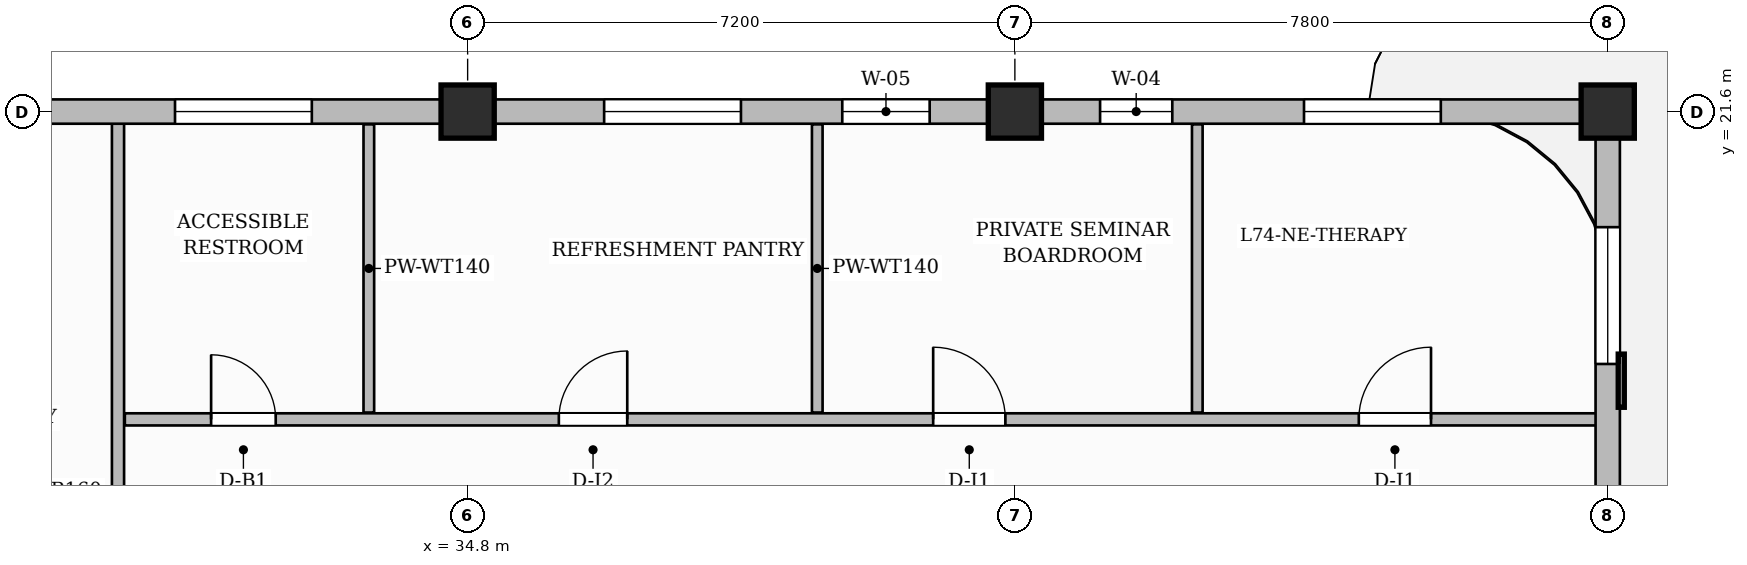
"""IFC4 building model, lengths in metres.
Left out: names, types, materials, properties, quantities, classifications, styles, units other than length and angle.
Written with IfcOpenShell. Run it as: python <this file> out.ifc"""

import sys

from ifc_helpers import new_model, si_unit, direction, frame, frame_2d, origin, origin_2d, place, context, subcontext, project, spatial, rectangle, extrude, source, transform, mapped, element, fill, save


model = new_model("IFC4")
c1 = context("Model", 3, precision=1e-05, world=origin(), true_north=direction((0.0, 1.0)))
c2 = subcontext(c1, "Body", "Model", "MODEL_VIEW")
j1 = project(units=[si_unit("LENGTHUNIT", "METRE"), si_unit("PLANEANGLEUNIT", "RADIAN")], contexts=[c1])
p1 = place(None, origin())
s1 = spatial("IfcSite", under=j1, at=p1, CompositionType="ELEMENT")
p2 = place(p1, origin())
s2 = spatial("IfcBuilding", under=s1, at=p2, CompositionType="ELEMENT")
p3 = place(p2, frame((0.0, 0.0, 294.3)))
s3 = spatial("IfcBuildingStorey", under=s2, at=p3, CompositionType="ELEMENT", Elevation=294.3)
m1 = source(origin(), c2, "Body", "SweptSolid", [
    extrude(rectangle(XDim=0.7, YDim=0.7, at=origin_2d()), origin(), (0.0, 0.0, 1.0), 4.8),
])
for number, where, z_axis, x_axis in (
    (1, (34.8, 21.6, 0.0), (0.0, 0.0, 1.0), (1.0, 0.0, 0.0)),
    (2, (42.0, 21.6, 0.0), (0.0, 0.0, 1.0), (1.0, 0.0, 0.0)),
    (3, (49.8, 21.6, 0.0), (0.0, 0.0, 1.0), (1.0, 0.0, 0.0)),
):
    element("IfcColumn", number, at=place(p3, frame(where, z_axis=z_axis, x_axis=x_axis)), inside=s3, PredefinedType="COLUMN", context=c2, shape_type="MappedRepresentation", body=[
        mapped(m1, transform((0.0, 0.0, 0.0), scale=1.0)),
    ])
p4 = place(p3, frame((30.2, 11.76, 0.0), z_axis=(0.0, 0.0, 1.0), x_axis=(0.0, 1.0, 0.0)))
e4 = element("IfcWall", 4, at=p4, inside=s3, PredefinedType="PARTITIONING", context=c2, shape_type="SweptSolid", body=[
    extrude(rectangle(XDim=9.7, YDim=0.16, at=frame_2d((4.85, 0.0))), origin(), (0.0, 0.0, 1.0), 4.5),
])
p5 = place(p3, frame((30.29, 17.55, 0.0), z_axis=(0.0, 0.0, 1.0), x_axis=(1.0, 0.0, 0.0)))
e5 = element("IfcWall", 5, at=p5, inside=s3, PredefinedType="PARTITIONING", context=c2, shape_type="SweptSolid", body=[
    extrude(rectangle(XDim=19.37, YDim=0.16, at=frame_2d((9.685, 0.0))), origin(), (0.0, 0.0, 1.0), 4.5),
])
p6 = place(p5, frame((1.135, 0.0, 0.0)))
e6 = element("IfcOpeningElement", 6, at=p6, cuts=e5, PredefinedType="OPENING", context=c2, shape_type="SweptSolid", body=[
    extrude(rectangle(XDim=0.85, YDim=2.1, at=frame_2d((0.425, 1.05))), frame((0.0, 0.09, 0.0), z_axis=(0.0, -1.0, 0.0), x_axis=(1.0, 0.0, 0.0)), (0.0, 0.0, 1.0), 0.18),
])
p7 = place(p5, frame((5.71, 0.0, 0.0)))
e7 = element("IfcOpeningElement", 7, at=p7, cuts=e5, PredefinedType="OPENING", context=c2, shape_type="SweptSolid", body=[
    extrude(rectangle(XDim=0.9, YDim=2.15, at=frame_2d((0.45, 1.075))), frame((0.0, 0.09, 0.0), z_axis=(0.0, -1.0, 0.0), x_axis=(1.0, 0.0, 0.0)), (0.0, 0.0, 1.0), 0.18),
])
p8 = place(p5, frame((10.635, 0.0, 0.0)))
e8 = element("IfcOpeningElement", 8, at=p8, cuts=e5, PredefinedType="OPENING", context=c2, shape_type="SweptSolid", body=[
    extrude(rectangle(XDim=0.95, YDim=2.15, at=frame_2d((0.475, 1.075))), frame((0.0, 0.09, 0.0), z_axis=(0.0, -1.0, 0.0), x_axis=(1.0, 0.0, 0.0)), (0.0, 0.0, 1.0), 0.18),
])
p9 = place(p5, frame((16.235, 0.0, 0.0)))
e9 = element("IfcOpeningElement", 9, at=p9, cuts=e5, PredefinedType="OPENING", context=c2, shape_type="SweptSolid", body=[
    extrude(rectangle(XDim=0.95, YDim=2.15, at=frame_2d((0.475, 1.075))), frame((0.0, 0.09, 0.0), z_axis=(0.0, -1.0, 0.0), x_axis=(1.0, 0.0, 0.0)), (0.0, 0.0, 1.0), 0.18),
])
for number, where, z_axis, x_axis in (
    (10, (33.5, 17.64, 0.0), (0.0, 0.0, 1.0), (0.0, 1.0, 0.0)),
    (11, (39.4, 17.64, 0.0), (0.0, 0.0, 1.0), (0.0, 1.0, 0.0)),
    (12, (44.4, 17.64, 0.0), (0.0, 0.0, 1.0), (0.0, 1.0, 0.0)),
):
    element("IfcWall", number, at=place(p3, frame(where, z_axis=z_axis, x_axis=x_axis)), inside=s3, PredefinedType="PARTITIONING", context=c2, shape_type="SweptSolid", body=[
        extrude(rectangle(XDim=3.792, YDim=0.14, at=frame_2d((1.896, 0.0))), origin(), (0.0, 0.0, 1.0), 4.5),
    ])
p10 = place(p3, frame((49.8, 14.62, 0.0), z_axis=(0.0, 0.0, 1.0), x_axis=(0.0, 1.0, 0.0)))
e13 = element("IfcWall", 13, at=p10, inside=s3, PredefinedType="SOLIDWALL", context=c2, shape_type="SweptSolid", body=[
    extrude(rectangle(XDim=6.93, YDim=0.32, at=frame_2d((3.465, 0.0))), origin(), (0.0, 0.0, 1.0), 4.085),
])
p11 = place(p10, frame((0.42, 0.0, 0.0)))
e14 = element("IfcOpeningElement", 14, at=p11, cuts=e13, PredefinedType="OPENING", context=c2, shape_type="SweptSolid", body=[
    extrude(rectangle(XDim=1.2, YDim=2.2, at=frame_2d((0.6, 1.1))), frame((0.0, 0.17, 0.0), z_axis=(0.0, -1.0, 0.0), x_axis=(1.0, 0.0, 0.0)), (0.0, 0.0, 1.0), 0.34),
])
p12 = place(p10, frame((3.659, 0.0, 0.8)))
e15 = element("IfcOpeningElement", 15, at=p12, cuts=e13, PredefinedType="OPENING", context=c2, shape_type="SweptSolid", body=[
    extrude(rectangle(XDim=1.8, YDim=1.85, at=frame_2d((0.9, 0.925))), frame((0.0, 0.17, 0.0), z_axis=(0.0, -1.0, 0.0), x_axis=(1.0, 0.0, 0.0)), (0.0, 0.0, 1.0), 0.34),
])
p13 = place(p3, frame((18.0, 21.6, 0.0), z_axis=(0.0, 0.0, 1.0), x_axis=(1.0, 0.0, 0.0)))
e16 = element("IfcWall", 16, at=p13, inside=s3, PredefinedType="SOLIDWALL", context=c2, shape_type="SweptSolid", body=[
    extrude(rectangle(XDim=31.8, YDim=0.32, at=frame_2d((15.9, 0.0))), origin(), (0.0, 0.0, 1.0), 3.785),
])
p14 = place(p13, frame((0.42, 0.0, 0.0)))
e17 = element("IfcOpeningElement", 17, at=p14, cuts=e16, PredefinedType="OPENING", context=c2, shape_type="SweptSolid", body=[
    extrude(rectangle(XDim=1.2, YDim=2.2, at=frame_2d((0.6, 1.1))), frame((0.0, 0.17, 0.0), z_axis=(0.0, -1.0, 0.0), x_axis=(1.0, 0.0, 0.0)), (0.0, 0.0, 1.0), 0.34),
])
p15 = place(p13, frame((4.671, 0.0, 0.8)))
e18 = element("IfcOpeningElement", 18, at=p15, cuts=e16, PredefinedType="OPENING", context=c2, shape_type="SweptSolid", body=[
    extrude(rectangle(XDim=1.15, YDim=1.8, at=frame_2d((0.575, 0.9))), frame((0.0, 0.17, 0.0), z_axis=(0.0, -1.0, 0.0), x_axis=(1.0, 0.0, 0.0)), (0.0, 0.0, 1.0), 0.34),
])
p16 = place(p13, frame((7.154, 0.0, 0.8)))
e19 = element("IfcOpeningElement", 19, at=p16, cuts=e16, PredefinedType="OPENING", context=c2, shape_type="SweptSolid", body=[
    extrude(rectangle(XDim=1.8, YDim=1.85, at=frame_2d((0.9, 0.925))), frame((0.0, 0.17, 0.0), z_axis=(0.0, -1.0, 0.0), x_axis=(1.0, 0.0, 0.0)), (0.0, 0.0, 1.0), 0.34),
])
p17 = place(p13, frame((12.95, 0.0, 0.8)))
e20 = element("IfcOpeningElement", 20, at=p17, cuts=e16, PredefinedType="OPENING", context=c2, shape_type="SweptSolid", body=[
    extrude(rectangle(XDim=1.8, YDim=1.85, at=frame_2d((0.9, 0.925))), frame((0.0, 0.17, 0.0), z_axis=(0.0, -1.0, 0.0), x_axis=(1.0, 0.0, 0.0)), (0.0, 0.0, 1.0), 0.34),
])
p18 = place(p13, frame((18.596, 0.0, 0.8)))
e21 = element("IfcOpeningElement", 21, at=p18, cuts=e16, PredefinedType="OPENING", context=c2, shape_type="SweptSolid", body=[
    extrude(rectangle(XDim=1.8, YDim=1.85, at=frame_2d((0.9, 0.925))), frame((0.0, 0.17, 0.0), z_axis=(0.0, -1.0, 0.0), x_axis=(1.0, 0.0, 0.0)), (0.0, 0.0, 1.0), 0.34),
])
p19 = place(p13, frame((21.729, 0.0, 0.8)))
e22 = element("IfcOpeningElement", 22, at=p19, cuts=e16, PredefinedType="OPENING", context=c2, shape_type="SweptSolid", body=[
    extrude(rectangle(XDim=1.15, YDim=1.8, at=frame_2d((0.575, 0.9))), frame((0.0, 0.17, 0.0), z_axis=(0.0, -1.0, 0.0), x_axis=(1.0, 0.0, 0.0)), (0.0, 0.0, 1.0), 0.34),
])
p20 = place(p13, frame((25.121, 0.0, 0.8)))
e23 = element("IfcOpeningElement", 23, at=p20, cuts=e16, PredefinedType="OPENING", context=c2, shape_type="SweptSolid", body=[
    extrude(rectangle(XDim=0.95, YDim=1.75, at=frame_2d((0.475, 0.875))), frame((0.0, 0.17, 0.0), z_axis=(0.0, -1.0, 0.0), x_axis=(1.0, 0.0, 0.0)), (0.0, 0.0, 1.0), 0.34),
])
p21 = place(p13, frame((27.804, 0.0, 0.8)))
e24 = element("IfcOpeningElement", 24, at=p21, cuts=e16, PredefinedType="OPENING", context=c2, shape_type="SweptSolid", body=[
    extrude(rectangle(XDim=1.8, YDim=1.85, at=frame_2d((0.9, 0.925))), frame((0.0, 0.17, 0.0), z_axis=(0.0, -1.0, 0.0), x_axis=(1.0, 0.0, 0.0)), (0.0, 0.0, 1.0), 0.34),
])
m2 = source(origin(), c2, "Body", "SweptSolid", [
    extrude(rectangle(XDim=0.85, YDim=2.1, at=frame_2d((0.425, 1.05))), frame((0.0, 0.025, 0.0), z_axis=(0.0, -1.0, 0.0), x_axis=(1.0, 0.0, 0.0)), (0.0, 0.0, 1.0), 0.05),
])
p22 = place(p6, origin())
e25 = element("IfcDoor", 25, at=p22, inside=s3, OperationType="SINGLE_SWING_LEFT", PredefinedType="DOOR", context=c2, shape_type="MappedRepresentation", body=[
    mapped(m2, transform((0.0, 0.0, 0.0), scale=1.0)),
])
fill(e6, e25)
m3 = source(origin(), c2, "Body", "SweptSolid", [
    extrude(rectangle(XDim=0.9, YDim=2.15, at=frame_2d((0.45, 1.075))), frame((0.0, 0.025, 0.0), z_axis=(0.0, -1.0, 0.0), x_axis=(1.0, 0.0, 0.0)), (0.0, 0.0, 1.0), 0.05),
])
p23 = place(p7, origin())
e26 = element("IfcDoor", 26, at=p23, inside=s3, OperationType="SINGLE_SWING_RIGHT", PredefinedType="DOOR", context=c2, shape_type="MappedRepresentation", body=[
    mapped(m3, transform((0.0, 0.0, 0.0), scale=1.0)),
])
fill(e7, e26)
m4 = source(origin(), c2, "Body", "SweptSolid", [
    extrude(rectangle(XDim=0.95, YDim=2.15, at=frame_2d((0.475, 1.075))), frame((0.0, 0.025, 0.0), z_axis=(0.0, -1.0, 0.0), x_axis=(1.0, 0.0, 0.0)), (0.0, 0.0, 1.0), 0.05),
])
p24 = place(p8, origin())
e27 = element("IfcDoor", 27, at=p24, inside=s3, OperationType="SINGLE_SWING_LEFT", PredefinedType="DOOR", context=c2, shape_type="MappedRepresentation", body=[
    mapped(m4, transform((0.0, 0.0, 0.0), scale=1.0)),
])
fill(e8, e27)
p25 = place(p9, origin())
e28 = element("IfcDoor", 28, at=p25, inside=s3, OperationType="SINGLE_SWING_RIGHT", PredefinedType="DOOR", context=c2, shape_type="MappedRepresentation", body=[
    mapped(m4, transform((0.0, 0.0, 0.0), scale=1.0)),
])
fill(e9, e28)
m5 = source(origin(), c2, "Body", "SweptSolid", [
    extrude(rectangle(XDim=1.8, YDim=1.85, at=frame_2d((0.9, 0.925))), frame((0.0, 0.03, 0.0), z_axis=(0.0, -1.0, 0.0), x_axis=(1.0, 0.0, 0.0)), (0.0, 0.0, 1.0), 0.06),
])
p26 = place(p12, origin())
e29 = element("IfcWindow", 29, at=p26, inside=s3, PartitioningType="DOUBLE_PANEL_VERTICAL", PredefinedType="WINDOW", context=c2, shape_type="MappedRepresentation", body=[
    mapped(m5, transform((0.0, 0.0, 0.0), scale=1.0)),
])
fill(e15, e29)
p27 = place(p17, origin())
e30 = element("IfcWindow", 30, at=p27, inside=s3, PartitioningType="DOUBLE_PANEL_VERTICAL", PredefinedType="WINDOW", context=c2, shape_type="MappedRepresentation", body=[
    mapped(m5, transform((0.0, 0.0, 0.0), scale=1.0)),
])
fill(e20, e30)
p28 = place(p18, origin())
e31 = element("IfcWindow", 31, at=p28, inside=s3, PartitioningType="DOUBLE_PANEL_VERTICAL", PredefinedType="WINDOW", context=c2, shape_type="MappedRepresentation", body=[
    mapped(m5, transform((0.0, 0.0, 0.0), scale=1.0)),
])
fill(e21, e31)
m6 = source(origin(), c2, "Body", "SweptSolid", [
    extrude(rectangle(XDim=1.15, YDim=1.8, at=frame_2d((0.575, 0.9))), frame((0.0, 0.03, 0.0), z_axis=(0.0, -1.0, 0.0), x_axis=(1.0, 0.0, 0.0)), (0.0, 0.0, 1.0), 0.06),
])
p29 = place(p19, origin())
e32 = element("IfcWindow", 32, at=p29, inside=s3, PartitioningType="SINGLE_PANEL", PredefinedType="WINDOW", context=c2, shape_type="MappedRepresentation", body=[
    mapped(m6, transform((0.0, 0.0, 0.0), scale=1.0)),
])
fill(e22, e32)
m7 = source(origin(), c2, "Body", "SweptSolid", [
    extrude(rectangle(XDim=0.95, YDim=1.75, at=frame_2d((0.475, 0.875))), frame((0.0, 0.03, 0.0), z_axis=(0.0, -1.0, 0.0), x_axis=(1.0, 0.0, 0.0)), (0.0, 0.0, 1.0), 0.06),
])
p30 = place(p20, origin())
e33 = element("IfcWindow", 33, at=p30, inside=s3, PartitioningType="SINGLE_PANEL", PredefinedType="WINDOW", context=c2, shape_type="MappedRepresentation", body=[
    mapped(m7, transform((0.0, 0.0, 0.0), scale=1.0)),
])
fill(e23, e33)
p31 = place(p21, origin())
e34 = element("IfcWindow", 34, at=p31, inside=s3, PartitioningType="DOUBLE_PANEL_VERTICAL", PredefinedType="WINDOW", context=c2, shape_type="MappedRepresentation", body=[
    mapped(m5, transform((0.0, 0.0, 0.0), scale=1.0)),
])
fill(e24, e34)
save(model, sys.argv[1])
